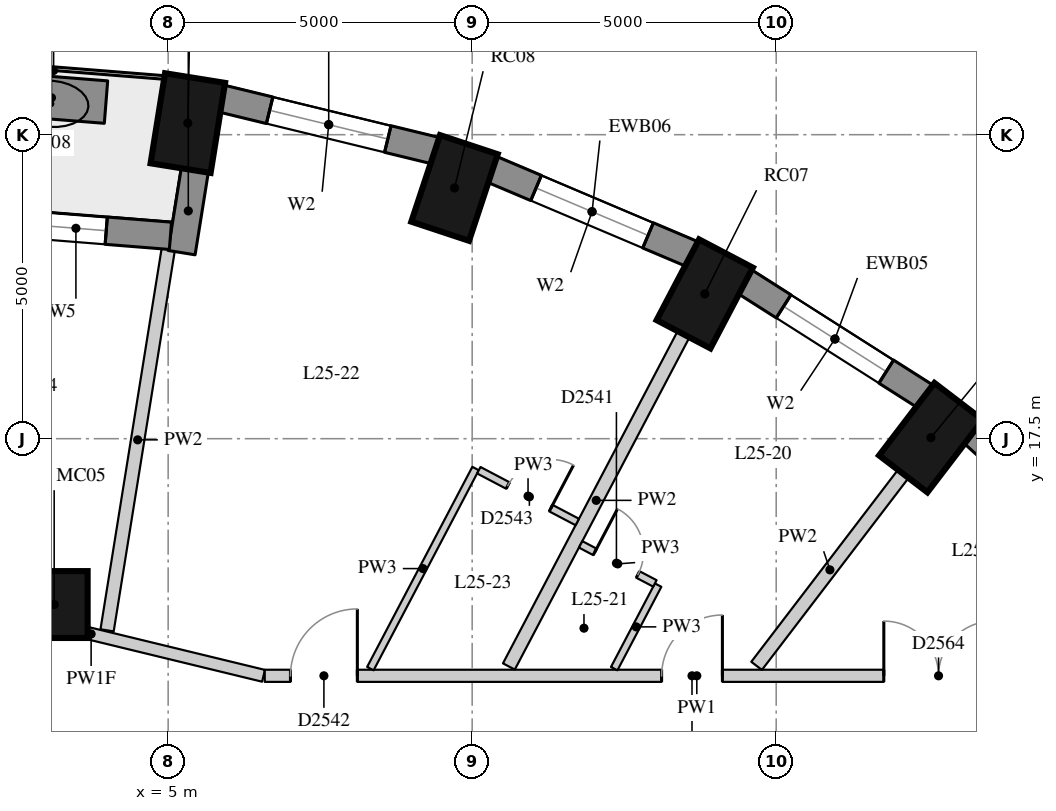
"""IFC4 building model, lengths in metres.
Left out: names, types, materials, properties, quantities, classifications, styles, units other than length and angle.
Written with IfcOpenShell. Run it as: python <this file> out.ifc"""

import sys

from ifc_helpers import new_model, si_unit, direction, frame, frame_2d, origin, origin_2d, place, context, subcontext, project, spatial, rectangle, extrude, element, fill, save


model = new_model("IFC4")
c1 = context("Model", 3, precision=1e-05, world=origin(), true_north=direction((0.0, 1.0)))
c2 = subcontext(c1, "Body", "Model", "MODEL_VIEW")
j1 = project(units=[si_unit("LENGTHUNIT", "METRE"), si_unit("PLANEANGLEUNIT", "RADIAN")], contexts=[c1])
p1 = place(None, origin())
s1 = spatial("IfcSite", under=j1, at=p1, CompositionType="ELEMENT")
p2 = place(p1, origin())
s2 = spatial("IfcBuilding", under=s1, at=p2, CompositionType="ELEMENT")
p3 = place(p2, frame((0.0, 0.0, 92.2)))
s3 = spatial("IfcBuildingStorey", under=s2, at=p3, CompositionType="ELEMENT", Elevation=92.2)
for number, where, z_axis, x_axis in (
    (1, (17.545, 17.517, 0.0), (0.0, 0.0, 1.0), (0.607, 0.795, 0.0)),
    (2, (13.825, 19.882, 0.0), (0.0, 0.0, 1.0), (0.465, 0.885, 0.0)),
    (3, (9.71, 21.624, 0.0), (0.0, 0.0, 1.0), (0.315, 0.949, 0.0)),
    (4, (5.323, 22.691, 0.0), (0.0, 0.0, 1.0), (0.159, 0.987, 0.0)),
):
    element("IfcColumn", number, at=place(p3, frame(where, z_axis=z_axis, x_axis=x_axis)), inside=s3, PredefinedType="COLUMN", context=c2, shape_type="SweptSolid", body=[
        extrude(rectangle(XDim=1.5, YDim=1.0, at=origin_2d()), origin(), (0.0, 0.0, 1.0), 3.3),
    ])
p4 = place(p3, frame((3.126, 14.772, 0.0), z_axis=(0.0, 0.0, 1.0), x_axis=(1.0, 0.0, 0.0)))
e5 = element("IfcColumn", 5, at=p4, inside=s3, PredefinedType="COLUMN", context=c2, shape_type="SweptSolid", body=[
    extrude(rectangle(XDim=1.1, YDim=1.1, at=origin_2d()), origin(), (0.0, 0.0, 1.0), 3.3),
])
p5 = place(p3, frame((20.784, 15.281, 0.0), z_axis=(0.0, 0.0, 1.0), x_axis=(-0.74032902847, 0.672244694739, 0.0)))
e6 = element("IfcWall", 6, at=p5, inside=s3, PredefinedType="SOLIDWALL", context=c2, shape_type="SweptSolid", body=[
    extrude(rectangle(XDim=3.464, YDim=0.45, at=frame_2d((1.732, 0.0))), origin(), (0.0, 0.0, 1.0), 3.02),
])
p6 = place(p3, frame((17.456, 18.192, 0.0), z_axis=(0.0, 0.0, 1.0), x_axis=(-0.843880549131, 0.536531097699, 0.0)))
e7 = element("IfcWall", 7, at=p6, inside=s3, PredefinedType="SOLIDWALL", context=c2, shape_type="SweptSolid", body=[
    extrude(rectangle(XDim=3.532, YDim=0.45, at=frame_2d((1.766, 0.0))), origin(), (0.0, 0.0, 1.0), 3.02),
])
p7 = place(p6, frame((0.766, 0.0, 0.4)))
e8 = element("IfcOpeningElement", 8, at=p7, cuts=e7, PredefinedType="OPENING", context=c2, shape_type="SweptSolid", body=[
    extrude(rectangle(XDim=2.0, YDim=1.75, at=frame_2d((1.0, 0.875))), frame((0.0, 0.235, 0.0), z_axis=(0.0, -1.0, 0.0), x_axis=(1.0, 0.0, 0.0)), (0.0, 0.0, 1.0), 0.47),
])
p8 = place(p3, frame((13.625, 20.533, 0.0), z_axis=(0.0, 0.0, 1.0), x_axis=(-0.920869643542, 0.389870619055, 0.0)))
e9 = element("IfcWall", 9, at=p8, inside=s3, PredefinedType="SOLIDWALL", context=c2, shape_type="SweptSolid", body=[
    extrude(rectangle(XDim=3.591, YDim=0.45, at=frame_2d((1.796, 0.0))), origin(), (0.0, 0.0, 1.0), 3.02),
])
p9 = place(p8, frame((0.796, 0.0, 0.4)))
e10 = element("IfcOpeningElement", 10, at=p9, cuts=e9, PredefinedType="OPENING", context=c2, shape_type="SweptSolid", body=[
    extrude(rectangle(XDim=2.0, YDim=1.75, at=frame_2d((1.0, 0.875))), frame((0.0, 0.235, 0.0), z_axis=(0.0, -1.0, 0.0), x_axis=(1.0, 0.0, 0.0)), (0.0, 0.0, 1.0), 0.47),
])
p10 = place(p3, frame((9.406, 22.235, 0.0), z_axis=(0.0, 0.0, 1.0), x_axis=(-0.971667603162, 0.236351579148, 0.0)))
e11 = element("IfcWall", 11, at=p10, inside=s3, PredefinedType="SOLIDWALL", context=c2, shape_type="SweptSolid", body=[
    extrude(rectangle(XDim=3.635, YDim=0.45, at=frame_2d((1.817, 0.0))), origin(), (0.0, 0.0, 1.0), 3.02),
])
p11 = place(p10, frame((0.817, 0.0, 0.4)))
e12 = element("IfcOpeningElement", 12, at=p11, cuts=e11, PredefinedType="OPENING", context=c2, shape_type="SweptSolid", body=[
    extrude(rectangle(XDim=2.0, YDim=1.75, at=frame_2d((1.0, 0.875))), frame((0.0, 0.235, 0.0), z_axis=(0.0, -1.0, 0.0), x_axis=(1.0, 0.0, 0.0)), (0.0, 0.0, 1.0), 0.47),
])
p12 = place(p3, frame((5.441, 21.932, 0.0), z_axis=(0.0, 0.0, 1.0), x_axis=(-0.158586380547, -0.987345106792, 0.0)))
e13 = element("IfcWall", 13, at=p12, inside=s3, PredefinedType="SOLIDWALL", context=c2, shape_type="SweptSolid", body=[
    extrude(rectangle(XDim=1.39, YDim=0.45, at=frame_2d((0.695, 0.0))), origin(), (0.0, 0.0, 1.0), 3.02),
])
p13 = place(p3, frame((5.038, 20.837, 0.0), z_axis=(0.0, 0.0, 1.0), x_axis=(-0.996839780714, 0.079438350855, 0.0)))
e14 = element("IfcWall", 14, at=p13, inside=s3, PredefinedType="SOLIDWALL", context=c2, shape_type="SweptSolid", body=[
    extrude(rectangle(XDim=4.269, YDim=0.45, at=frame_2d((2.134, 0.0))), origin(), (0.0, 0.0, 1.0), 3.02),
])
p14 = place(p13, frame((1.06, 0.0, 0.4)))
e15 = element("IfcOpeningElement", 15, at=p14, cuts=e14, PredefinedType="OPENING", context=c2, shape_type="SweptSolid", body=[
    extrude(rectangle(XDim=1.0, YDim=1.75, at=frame_2d((0.5, 0.875))), frame((0.0, 0.235, 0.0), z_axis=(0.0, -1.0, 0.0), x_axis=(1.0, 0.0, 0.0)), (0.0, 0.0, 1.0), 0.47),
])
p15 = place(p13, frame((2.209, 0.0, 0.0)))
e16 = element("IfcOpeningElement", 16, at=p15, cuts=e14, PredefinedType="OPENING", context=c2, shape_type="SweptSolid", body=[
    extrude(rectangle(XDim=1.0, YDim=2.15, at=frame_2d((0.5, 1.075))), frame((0.0, 0.235, 0.0), z_axis=(0.0, -1.0, 0.0), x_axis=(1.0, 0.0, 0.0)), (0.0, 0.0, 1.0), 0.47),
])
p16 = place(p3, frame((3.978, 23.036, 0.0), z_axis=(0.0, 0.0, 1.0), x_axis=(-0.996858257414, 0.079206152698, 0.0)))
e17 = element("IfcWall", 17, at=p16, inside=s3, PredefinedType="USERDEFINED", context=c2, shape_type="SweptSolid", body=[
    extrude(rectangle(XDim=1.8, YDim=0.7, at=frame_2d((0.9, 0.0))), origin(), (0.0, 0.0, 1.0), 0.75),
])
p17 = place(p3, frame((0.898, 14.977, 0.0), z_axis=(0.0, 0.0, 1.0), x_axis=(0.971773711573, -0.235914928515, 0.0)))
e18 = element("IfcWall", 18, at=p17, inside=s3, PredefinedType="PARTITIONING", context=c2, shape_type="SweptSolid", body=[
    extrude(rectangle(XDim=5.836, YDim=0.2, at=frame_2d((2.918, 0.0))), origin(), (0.0, 0.0, 1.0), 2.42),
])
p18 = place(p17, frame((0.22, 0.0, 0.0)))
e19 = element("IfcOpeningElement", 19, at=p18, cuts=e18, PredefinedType="OPENING", context=c2, shape_type="SweptSolid", body=[
    extrude(rectangle(XDim=0.9, YDim=2.1, at=frame_2d((0.45, 1.05))), frame((0.0, 0.11, 0.0), z_axis=(0.0, -1.0, 0.0), x_axis=(1.0, 0.0, 0.0)), (0.0, 0.0, 1.0), 0.22),
])
p19 = place(p3, frame((6.589, 13.6, 0.0), z_axis=(0.0, 0.0, 1.0), x_axis=(1.0, 0.0, 0.0)))
e20 = element("IfcWall", 20, at=p19, inside=s3, PredefinedType="PARTITIONING", context=c2, shape_type="SweptSolid", body=[
    extrude(rectangle(XDim=14.211, YDim=0.2, at=frame_2d((7.106, 0.0))), origin(), (0.0, 0.0, 1.0), 3.02),
])
p20 = place(p19, frame((6.527, 0.0, 0.0)))
e21 = element("IfcOpeningElement", 21, at=p20, cuts=e20, PredefinedType="OPENING", context=c2, shape_type="SweptSolid", body=[
    extrude(rectangle(XDim=1.0, YDim=2.1, at=frame_2d((0.5, 1.05))), frame((0.0, 0.11, 0.0), z_axis=(0.0, -1.0, 0.0), x_axis=(1.0, 0.0, 0.0)), (0.0, 0.0, 1.0), 0.22),
])
p21 = place(p19, frame((0.423, 0.0, 0.0)))
e22 = element("IfcOpeningElement", 22, at=p21, cuts=e20, PredefinedType="OPENING", context=c2, shape_type="SweptSolid", body=[
    extrude(rectangle(XDim=1.1, YDim=2.1, at=frame_2d((0.55, 1.05))), frame((0.0, 0.11, 0.0), z_axis=(0.0, -1.0, 0.0), x_axis=(1.0, 0.0, 0.0)), (0.0, 0.0, 1.0), 0.22),
])
p22 = place(p19, frame((10.181, 0.0, 0.0)))
e23 = element("IfcOpeningElement", 23, at=p22, cuts=e20, PredefinedType="OPENING", context=c2, shape_type="SweptSolid", body=[
    extrude(rectangle(XDim=1.8, YDim=2.1, at=frame_2d((0.9, 1.05))), frame((0.0, 0.11, 0.0), z_axis=(0.0, -1.0, 0.0), x_axis=(1.0, 0.0, 0.0)), (0.0, 0.0, 1.0), 0.22),
])
p23 = place(p3, frame((17.089, 16.921, 0.0), z_axis=(0.0, 0.0, 1.0), x_axis=(-0.607055443677, -0.794659479464, 0.0)))
e24 = element("IfcWall", 24, at=p23, inside=s3, PredefinedType="PARTITIONING", context=c2, shape_type="SweptSolid", body=[
    extrude(rectangle(XDim=3.973, YDim=0.22, at=frame_2d((1.987, 0.0))), origin(), (0.0, 0.0, 1.0), 3.02),
])
p24 = place(p3, frame((13.476, 19.218, 0.0), z_axis=(0.0, 0.0, 1.0), x_axis=(-0.465345394262, -0.885129179295, 0.0)))
e25 = element("IfcWall", 25, at=p24, inside=s3, PredefinedType="PARTITIONING", context=c2, shape_type="SweptSolid", body=[
    extrude(rectangle(XDim=6.173, YDim=0.22, at=frame_2d((3.086, 0.0))), origin(), (0.0, 0.0, 1.0), 3.02),
])
p25 = place(p3, frame((5.002, 20.614, 0.0), z_axis=(0.0, 0.0, 1.0), x_axis=(-0.158494605855, -0.987359843175, 0.0)))
e26 = element("IfcWall", 26, at=p25, inside=s3, PredefinedType="PARTITIONING", context=c2, shape_type="SweptSolid", body=[
    extrude(rectangle(XDim=6.346, YDim=0.22, at=frame_2d((3.173, 0.0))), origin(), (0.0, 0.0, 1.0), 3.02),
])
p26 = place(p3, frame((12.336, 13.718, 0.0), z_axis=(0.0, 0.0, 1.0), x_axis=(0.465428746876, 0.88508535271, 0.0)))
e27 = element("IfcWall", 27, at=p26, inside=s3, PredefinedType="PARTITIONING", context=c2, shape_type="SweptSolid", body=[
    extrude(rectangle(XDim=1.552, YDim=0.12, at=frame_2d((0.776, 0.0))), origin(), (0.0, 0.0, 1.0), 3.02),
])
p27 = place(p3, frame((8.325, 13.718, 0.0), z_axis=(0.0, 0.0, 1.0), x_axis=(0.465348566369, 0.885127511593, 0.0)))
e28 = element("IfcWall", 28, at=p27, inside=s3, PredefinedType="PARTITIONING", context=c2, shape_type="SweptSolid", body=[
    extrude(rectangle(XDim=3.718, YDim=0.12, at=frame_2d((1.859, 0.0))), origin(), (0.0, 0.0, 1.0), 3.02),
])
p28 = place(p3, frame((13.005, 15.12, 0.0), z_axis=(0.0, 0.0, 1.0), x_axis=(-0.885148383454, 0.465308864378, 0.0)))
e29 = element("IfcWall", 29, at=p28, inside=s3, PredefinedType="PARTITIONING", context=c2, shape_type="SweptSolid", body=[
    extrude(rectangle(XDim=1.38, YDim=0.12, at=frame_2d((0.69, 0.0))), origin(), (0.0, 0.0, 1.0), 3.02),
])
p29 = place(p28, frame((0.315, 0.0, 0.0)))
e30 = element("IfcOpeningElement", 30, at=p29, cuts=e29, PredefinedType="OPENING", context=c2, shape_type="SweptSolid", body=[
    extrude(rectangle(XDim=0.8, YDim=2.1, at=frame_2d((0.4, 1.05))), frame((0.0, 0.07, 0.0), z_axis=(0.0, -1.0, 0.0), x_axis=(1.0, 0.0, 0.0)), (0.0, 0.0, 1.0), 0.14),
])
p30 = place(p3, frame((10.109, 16.981, 0.0), z_axis=(0.0, 0.0, 1.0), x_axis=(0.885114946598, -0.465372465139, 0.0)))
e31 = element("IfcWall", 31, at=p30, inside=s3, PredefinedType="PARTITIONING", context=c2, shape_type="SweptSolid", body=[
    extrude(rectangle(XDim=1.83, YDim=0.12, at=frame_2d((0.915, 0.0))), origin(), (0.0, 0.0, 1.0), 3.02),
])
p31 = place(p30, frame((0.54, 0.0, 0.0)))
e32 = element("IfcOpeningElement", 32, at=p31, cuts=e31, PredefinedType="OPENING", context=c2, shape_type="SweptSolid", body=[
    extrude(rectangle(XDim=0.8, YDim=2.1, at=frame_2d((0.4, 1.05))), frame((0.0, 0.07, 0.0), z_axis=(0.0, -1.0, 0.0), x_axis=(1.0, 0.0, 0.0)), (0.0, 0.0, 1.0), 0.14),
])
p32 = place(p7, origin())
e33 = element("IfcWindow", 33, at=p32, inside=s3, PartitioningType="SINGLE_PANEL", PredefinedType="WINDOW", context=c2, shape_type="SweptSolid", body=[
    extrude(rectangle(XDim=2.0, YDim=1.75, at=frame_2d((1.0, 0.875))), frame((0.0, 0.035, 0.0), z_axis=(0.0, -1.0, 0.0), x_axis=(1.0, 0.0, 0.0)), (0.0, 0.0, 1.0), 0.06),
])
fill(e8, e33)
p33 = place(p9, origin())
e34 = element("IfcWindow", 34, at=p33, inside=s3, PartitioningType="SINGLE_PANEL", PredefinedType="WINDOW", context=c2, shape_type="SweptSolid", body=[
    extrude(rectangle(XDim=2.0, YDim=1.75, at=frame_2d((1.0, 0.875))), frame((0.0, 0.035, 0.0), z_axis=(0.0, -1.0, 0.0), x_axis=(1.0, 0.0, 0.0)), (0.0, 0.0, 1.0), 0.06),
])
fill(e10, e34)
p34 = place(p11, origin())
e35 = element("IfcWindow", 35, at=p34, inside=s3, PartitioningType="SINGLE_PANEL", PredefinedType="WINDOW", context=c2, shape_type="SweptSolid", body=[
    extrude(rectangle(XDim=2.0, YDim=1.75, at=frame_2d((1.0, 0.875))), frame((0.0, 0.035, 0.0), z_axis=(0.0, -1.0, 0.0), x_axis=(1.0, 0.0, 0.0)), (0.0, 0.0, 1.0), 0.06),
])
fill(e12, e35)
p35 = place(p14, origin())
e36 = element("IfcWindow", 36, at=p35, inside=s3, PartitioningType="SINGLE_PANEL", PredefinedType="WINDOW", context=c2, shape_type="SweptSolid", body=[
    extrude(rectangle(XDim=1.0, YDim=1.75, at=frame_2d((0.5, 0.875))), frame((0.0, 0.035, 0.0), z_axis=(0.0, -1.0, 0.0), x_axis=(1.0, 0.0, 0.0)), (0.0, 0.0, 1.0), 0.06),
])
fill(e15, e36)
p36 = place(p20, origin())
e37 = element("IfcDoor", 37, at=p36, inside=s3, OperationType="SINGLE_SWING_RIGHT", PredefinedType="DOOR", context=c2, shape_type="SweptSolid", body=[
    extrude(rectangle(XDim=1.0, YDim=2.1, at=frame_2d((0.5, 1.05))), frame((0.0, 0.025, 0.0), z_axis=(0.0, -1.0, 0.0), x_axis=(1.0, 0.0, 0.0)), (0.0, 0.0, 1.0), 0.05),
])
fill(e21, e37)
p37 = place(p29, origin())
e38 = element("IfcDoor", 38, at=p37, inside=s3, OperationType="SINGLE_SWING_LEFT", PredefinedType="DOOR", context=c2, shape_type="SweptSolid", body=[
    extrude(rectangle(XDim=0.8, YDim=2.1, at=frame_2d((0.4, 1.05))), frame((0.0, 0.025, 0.0), z_axis=(0.0, -1.0, 0.0), x_axis=(1.0, 0.0, 0.0)), (0.0, 0.0, 1.0), 0.05),
])
fill(e30, e38)
p38 = place(p21, origin())
e39 = element("IfcDoor", 39, at=p38, inside=s3, OperationType="SINGLE_SWING_RIGHT", PredefinedType="DOOR", context=c2, shape_type="SweptSolid", body=[
    extrude(rectangle(XDim=1.1, YDim=2.1, at=frame_2d((0.55, 1.05))), frame((0.0, 0.025, 0.0), z_axis=(0.0, -1.0, 0.0), x_axis=(1.0, 0.0, 0.0)), (0.0, 0.0, 1.0), 0.05),
])
fill(e22, e39)
p39 = place(p31, origin())
e40 = element("IfcDoor", 40, at=p39, inside=s3, OperationType="SINGLE_SWING_RIGHT", PredefinedType="DOOR", context=c2, shape_type="SweptSolid", body=[
    extrude(rectangle(XDim=0.8, YDim=2.1, at=frame_2d((0.4, 1.05))), frame((0.0, 0.025, 0.0), z_axis=(0.0, -1.0, 0.0), x_axis=(1.0, 0.0, 0.0)), (0.0, 0.0, 1.0), 0.05),
])
fill(e32, e40)
p40 = place(p22, origin())
e41 = element("IfcDoor", 41, at=p40, inside=s3, OperationType="DOUBLE_DOOR_SINGLE_SWING", PredefinedType="DOOR", context=c2, shape_type="SweptSolid", body=[
    extrude(rectangle(XDim=1.8, YDim=2.1, at=frame_2d((0.9, 1.05))), frame((0.0, 0.025, 0.0), z_axis=(0.0, -1.0, 0.0), x_axis=(1.0, 0.0, 0.0)), (0.0, 0.0, 1.0), 0.05),
])
fill(e23, e41)
save(model, sys.argv[1])
